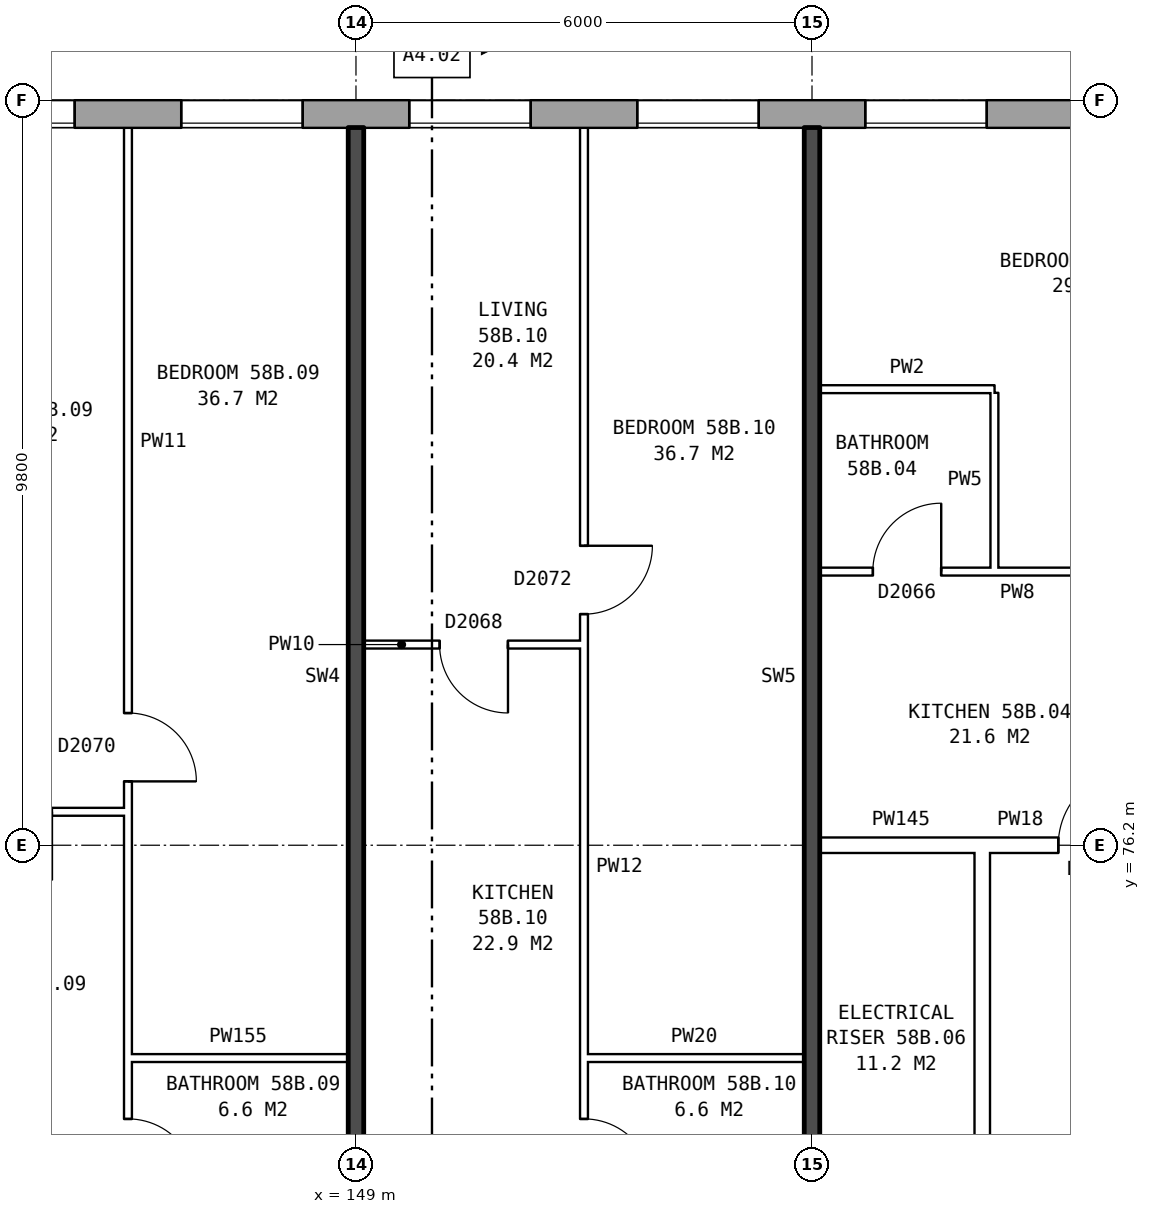
"""IFC4 building model, lengths in metres.
Left out: names, types, materials, properties, quantities, classifications, styles, units other than length and angle.
Written with IfcOpenShell. Run it as: python <this file> out.ifc"""

import sys

from ifc_helpers import new_model, si_unit, direction, frame, frame_2d, origin, place, context, subcontext, project, spatial, rectangle, extrude, element, fill, save


model = new_model("IFC4")
c1 = context("Model", 3, precision=1e-05, world=origin(), true_north=direction((0.0, 1.0)))
c2 = subcontext(c1, "Body", "Model", "MODEL_VIEW")
j1 = project(units=[si_unit("LENGTHUNIT", "METRE"), si_unit("PLANEANGLEUNIT", "RADIAN")], contexts=[c1])
p1 = place(None, origin())
s1 = spatial("IfcSite", under=j1, at=p1, CompositionType="ELEMENT")
p2 = place(p1, origin())
s2 = spatial("IfcBuilding", under=s1, at=p2, CompositionType="ELEMENT")
p3 = place(p2, frame((0.0, 0.0, 205.9)))
s3 = spatial("IfcBuildingStorey", under=s2, at=p3, CompositionType="ELEMENT", Elevation=205.9)
p4 = place(p3, frame((165.925, 85.82, 0.0), z_axis=(0.0, 0.0, 1.0), x_axis=(-1.0, 0.0, 0.0)))
e1 = element("IfcWall", 1, at=p4, inside=s3, PredefinedType="STANDARD", context=c2, shape_type="SweptSolid", body=[
    extrude(rectangle(XDim=33.875, YDim=0.36, at=frame_2d((16.938, 0.0))), origin(), (0.0, 0.0, 1.0), 2.85),
])
p5 = place(p4, frame((2.625, 0.0, 0.8)))
e2 = element("IfcOpeningElement", 2, at=p5, cuts=e1, PredefinedType="OPENING", context=c2, shape_type="SweptSolid", body=[
    extrude(rectangle(XDim=1.6, YDim=1.8, at=frame_2d((0.8, 0.9))), frame((0.0, 0.19, 0.0), z_axis=(0.0, -1.0, 0.0), x_axis=(1.0, 0.0, 0.0)), (0.0, 0.0, 1.0), 0.38),
])
p6 = place(p4, frame((5.625, 0.0, 0.8)))
e3 = element("IfcOpeningElement", 3, at=p6, cuts=e1, PredefinedType="OPENING", context=c2, shape_type="SweptSolid", body=[
    extrude(rectangle(XDim=1.6, YDim=1.8, at=frame_2d((0.8, 0.9))), frame((0.0, 0.19, 0.0), z_axis=(0.0, -1.0, 0.0), x_axis=(1.0, 0.0, 0.0)), (0.0, 0.0, 1.0), 0.38),
])
p7 = place(p4, frame((8.625, 0.0, 0.8)))
e4 = element("IfcOpeningElement", 4, at=p7, cuts=e1, PredefinedType="OPENING", context=c2, shape_type="SweptSolid", body=[
    extrude(rectangle(XDim=1.6, YDim=1.8, at=frame_2d((0.8, 0.9))), frame((0.0, 0.19, 0.0), z_axis=(0.0, -1.0, 0.0), x_axis=(1.0, 0.0, 0.0)), (0.0, 0.0, 1.0), 0.38),
])
p8 = place(p4, frame((11.625, 0.0, 0.8)))
e5 = element("IfcOpeningElement", 5, at=p8, cuts=e1, PredefinedType="OPENING", context=c2, shape_type="SweptSolid", body=[
    extrude(rectangle(XDim=1.6, YDim=1.8, at=frame_2d((0.8, 0.9))), frame((0.0, 0.19, 0.0), z_axis=(0.0, -1.0, 0.0), x_axis=(1.0, 0.0, 0.0)), (0.0, 0.0, 1.0), 0.38),
])
p9 = place(p4, frame((14.625, 0.0, 0.8)))
e6 = element("IfcOpeningElement", 6, at=p9, cuts=e1, PredefinedType="OPENING", context=c2, shape_type="SweptSolid", body=[
    extrude(rectangle(XDim=1.6, YDim=1.8, at=frame_2d((0.8, 0.9))), frame((0.0, 0.19, 0.0), z_axis=(0.0, -1.0, 0.0), x_axis=(1.0, 0.0, 0.0)), (0.0, 0.0, 1.0), 0.38),
])
p10 = place(p4, frame((17.625, 0.0, 0.8)))
e7 = element("IfcOpeningElement", 7, at=p10, cuts=e1, PredefinedType="OPENING", context=c2, shape_type="SweptSolid", body=[
    extrude(rectangle(XDim=1.6, YDim=1.8, at=frame_2d((0.8, 0.9))), frame((0.0, 0.19, 0.0), z_axis=(0.0, -1.0, 0.0), x_axis=(1.0, 0.0, 0.0)), (0.0, 0.0, 1.0), 0.38),
])
p11 = place(p4, frame((20.625, 0.0, 0.8)))
e8 = element("IfcOpeningElement", 8, at=p11, cuts=e1, PredefinedType="OPENING", context=c2, shape_type="SweptSolid", body=[
    extrude(rectangle(XDim=1.6, YDim=1.8, at=frame_2d((0.8, 0.9))), frame((0.0, 0.19, 0.0), z_axis=(0.0, -1.0, 0.0), x_axis=(1.0, 0.0, 0.0)), (0.0, 0.0, 1.0), 0.38),
])
p12 = place(p4, frame((23.625, 0.0, 0.8)))
e9 = element("IfcOpeningElement", 9, at=p12, cuts=e1, PredefinedType="OPENING", context=c2, shape_type="SweptSolid", body=[
    extrude(rectangle(XDim=1.6, YDim=1.8, at=frame_2d((0.8, 0.9))), frame((0.0, 0.19, 0.0), z_axis=(0.0, -1.0, 0.0), x_axis=(1.0, 0.0, 0.0)), (0.0, 0.0, 1.0), 0.38),
])
p13 = place(p4, frame((26.625, 0.0, 0.8)))
e10 = element("IfcOpeningElement", 10, at=p13, cuts=e1, PredefinedType="OPENING", context=c2, shape_type="SweptSolid", body=[
    extrude(rectangle(XDim=1.6, YDim=1.8, at=frame_2d((0.8, 0.9))), frame((0.0, 0.19, 0.0), z_axis=(0.0, -1.0, 0.0), x_axis=(1.0, 0.0, 0.0)), (0.0, 0.0, 1.0), 0.38),
])
p14 = place(p4, frame((29.125, 0.0, 0.8)))
e11 = element("IfcOpeningElement", 11, at=p14, cuts=e1, PredefinedType="OPENING", context=c2, shape_type="SweptSolid", body=[
    extrude(rectangle(XDim=1.4, YDim=1.8, at=frame_2d((0.7, 0.9))), frame((0.0, 0.19, 0.0), z_axis=(0.0, -1.0, 0.0), x_axis=(1.0, 0.0, 0.0)), (0.0, 0.0, 1.0), 0.38),
])
p15 = place(p4, frame((32.625, 0.0, 1.1)))
e12 = element("IfcOpeningElement", 12, at=p15, cuts=e1, PredefinedType="OPENING", context=c2, shape_type="SweptSolid", body=[
    extrude(rectangle(XDim=0.8, YDim=1.5, at=frame_2d((0.4, 0.75))), frame((0.0, 0.19, 0.0), z_axis=(0.0, -1.0, 0.0), x_axis=(1.0, 0.0, 0.0)), (0.0, 0.0, 1.0), 0.38),
])
p16 = place(p3, frame((157.24, 63.9, 0.0), z_axis=(0.0, 0.0, 1.0), x_axis=(0.0, 1.0, 0.0)))
e13 = element("IfcWall", 13, at=p16, inside=s3, PredefinedType="PARTITIONING", context=c2, shape_type="SweptSolid", body=[
    extrude(rectangle(XDim=12.2, YDim=0.2, at=frame_2d((6.1, 0.0))), origin(), (0.0, 0.0, 1.0), 2.85),
])
p17 = place(p16, frame((5.1, 0.0, 0.0)))
e14 = element("IfcOpeningElement", 14, at=p17, cuts=e13, PredefinedType="OPENING", context=c2, shape_type="SweptSolid", body=[
    extrude(rectangle(XDim=2.0, YDim=2.1, at=frame_2d((1.0, 1.05))), frame((0.0, 0.11, 0.0), z_axis=(0.0, -1.0, 0.0), x_axis=(1.0, 0.0, 0.0)), (0.0, 0.0, 1.0), 0.22),
])
for number, where, z_axis, x_axis in (
    (15, (146.0, 73.4, 0.0), (0.0, 0.0, 1.0), (1.0, 0.0, 0.0)),
    (16, (152.0, 73.4, 0.0), (0.0, 0.0, 1.0), (1.0, 0.0, 0.0)),
):
    element("IfcWall", number, at=place(p3, frame(where, z_axis=z_axis, x_axis=x_axis)), inside=s3, PredefinedType="PARTITIONING", context=c2, shape_type="SweptSolid", body=[
        extrude(rectangle(XDim=2.9, YDim=0.1, at=frame_2d((1.45, 0.0))), origin(), (0.0, 0.0, 1.0), 2.85),
    ])
p18 = place(p3, frame((155.1, 76.2, 0.0), z_axis=(0.0, 0.0, 1.0), x_axis=(1.0, 0.0, 0.0)))
e17 = element("IfcWall", 17, at=p18, inside=s3, PredefinedType="PARTITIONING", context=c2, shape_type="SweptSolid", body=[
    extrude(rectangle(XDim=2.14, YDim=0.2, at=frame_2d((1.07, 0.0))), origin(), (0.0, 0.0, 1.0), 2.85),
])
p19 = place(p3, frame((157.24, 76.2, 0.0), z_axis=(0.0, 0.0, 1.0), x_axis=(1.0, 0.0, 0.0)))
e18 = element("IfcWall", 18, at=p19, inside=s3, PredefinedType="PARTITIONING", context=c2, shape_type="SweptSolid", body=[
    extrude(rectangle(XDim=3.0, YDim=0.2, at=frame_2d((1.5, 0.0))), origin(), (0.0, 0.0, 1.0), 2.85),
])
p20 = place(p19, frame((1.0, 0.0, 0.0)))
e19 = element("IfcOpeningElement", 19, at=p20, cuts=e18, PredefinedType="OPENING", context=c2, shape_type="SweptSolid", body=[
    extrude(rectangle(XDim=1.0, YDim=2.1, at=frame_2d((0.5, 1.05))), frame((0.0, 0.11, 0.0), z_axis=(0.0, -1.0, 0.0), x_axis=(1.0, 0.0, 0.0)), (0.0, 0.0, 1.0), 0.22),
])
p21 = place(p3, frame((143.1, 76.64, 0.0), z_axis=(0.0, 0.0, 1.0), x_axis=(1.0, 0.0, 0.0)))
e20 = element("IfcWall", 20, at=p21, inside=s3, PredefinedType="PARTITIONING", context=c2, shape_type="SweptSolid", body=[
    extrude(rectangle(XDim=2.9, YDim=0.1, at=frame_2d((1.45, 0.0))), origin(), (0.0, 0.0, 1.0), 2.85),
])
p22 = place(p21, frame((1.0, 0.0, 0.0)))
e21 = element("IfcOpeningElement", 21, at=p22, cuts=e20, PredefinedType="OPENING", context=c2, shape_type="SweptSolid", body=[
    extrude(rectangle(XDim=0.9, YDim=2.1, at=frame_2d((0.45, 1.05))), frame((0.0, 0.06, 0.0), z_axis=(0.0, -1.0, 0.0), x_axis=(1.0, 0.0, 0.0)), (0.0, 0.0, 1.0), 0.12),
])
p23 = place(p3, frame((149.1, 78.84, 0.0), z_axis=(0.0, 0.0, 1.0), x_axis=(1.0, 0.0, 0.0)))
e22 = element("IfcWall", 22, at=p23, inside=s3, PredefinedType="PARTITIONING", context=c2, shape_type="SweptSolid", body=[
    extrude(rectangle(XDim=2.9, YDim=0.1, at=frame_2d((1.45, 0.0))), origin(), (0.0, 0.0, 1.0), 2.85),
])
p24 = place(p23, frame((1.0, 0.0, 0.0)))
e23 = element("IfcOpeningElement", 23, at=p24, cuts=e22, PredefinedType="OPENING", context=c2, shape_type="SweptSolid", body=[
    extrude(rectangle(XDim=0.9, YDim=2.1, at=frame_2d((0.45, 1.05))), frame((0.0, 0.06, 0.0), z_axis=(0.0, -1.0, 0.0), x_axis=(1.0, 0.0, 0.0)), (0.0, 0.0, 1.0), 0.12),
])
p25 = place(p3, frame((155.1, 79.8, 0.0), z_axis=(0.0, 0.0, 1.0), x_axis=(1.0, 0.0, 0.0)))
e24 = element("IfcWall", 24, at=p25, inside=s3, PredefinedType="PARTITIONING", context=c2, shape_type="SweptSolid", body=[
    extrude(rectangle(XDim=5.8, YDim=0.1, at=frame_2d((2.9, 0.0))), origin(), (0.0, 0.0, 1.0), 2.85),
])
p26 = place(p25, frame((3.6, 0.0, 0.0)))
e25 = element("IfcOpeningElement", 25, at=p26, cuts=e24, PredefinedType="OPENING", context=c2, shape_type="SweptSolid", body=[
    extrude(rectangle(XDim=0.9, YDim=2.1, at=frame_2d((0.45, 1.05))), frame((0.0, 0.06, 0.0), z_axis=(0.0, -1.0, 0.0), x_axis=(1.0, 0.0, 0.0)), (0.0, 0.0, 1.0), 0.12),
])
p27 = place(p25, frame((0.7, 0.0, 0.0)))
e26 = element("IfcOpeningElement", 26, at=p27, cuts=e24, PredefinedType="OPENING", context=c2, shape_type="SweptSolid", body=[
    extrude(rectangle(XDim=0.9, YDim=2.1, at=frame_2d((0.45, 1.05))), frame((0.0, 0.06, 0.0), z_axis=(0.0, -1.0, 0.0), x_axis=(1.0, 0.0, 0.0)), (0.0, 0.0, 1.0), 0.12),
])
p28 = place(p3, frame((155.1, 82.2, 0.0), z_axis=(0.0, 0.0, 1.0), x_axis=(1.0, 0.0, 0.0)))
e27 = element("IfcWall", 27, at=p28, inside=s3, PredefinedType="PARTITIONING", context=c2, shape_type="SweptSolid", body=[
    extrude(rectangle(XDim=2.3, YDim=0.1, at=frame_2d((1.15, 0.0))), origin(), (0.0, 0.0, 1.0), 2.85),
])
p29 = place(p3, frame((146.0, 71.3, 0.0), z_axis=(0.0, 0.0, 1.0), x_axis=(0.0, 1.0, 0.0)))
e28 = element("IfcWall", 28, at=p29, inside=s3, PredefinedType="PARTITIONING", context=c2, shape_type="SweptSolid", body=[
    extrude(rectangle(XDim=14.34, YDim=0.1, at=frame_2d((7.17, 0.0))), origin(), (0.0, 0.0, 1.0), 2.85),
])
p30 = place(p29, frame((5.74, 0.0, 0.0)))
e29 = element("IfcOpeningElement", 29, at=p30, cuts=e28, PredefinedType="OPENING", context=c2, shape_type="SweptSolid", body=[
    extrude(rectangle(XDim=0.9, YDim=2.1, at=frame_2d((0.45, 1.05))), frame((0.0, 0.06, 0.0), z_axis=(0.0, -1.0, 0.0), x_axis=(1.0, 0.0, 0.0)), (0.0, 0.0, 1.0), 0.12),
])
p31 = place(p29, frame((0.4, 0.0, 0.0)))
e30 = element("IfcOpeningElement", 30, at=p31, cuts=e28, PredefinedType="OPENING", context=c2, shape_type="SweptSolid", body=[
    extrude(rectangle(XDim=0.9, YDim=2.1, at=frame_2d((0.45, 1.05))), frame((0.0, 0.06, 0.0), z_axis=(0.0, -1.0, 0.0), x_axis=(1.0, 0.0, 0.0)), (0.0, 0.0, 1.0), 0.12),
])
p32 = place(p3, frame((149.0, 71.2, 0.0), z_axis=(0.0, 0.0, 1.0), x_axis=(0.0, 1.0, 0.0)))
e31 = element("IfcWall", 31, at=p32, inside=s3, PredefinedType="SOLIDWALL", context=c2, shape_type="SweptSolid", body=[
    extrude(rectangle(XDim=14.44, YDim=0.2, at=frame_2d((7.22, 0.0))), origin(), (0.0, 0.0, 1.0), 2.85),
])
p33 = place(p3, frame((152.0, 71.3, 0.0), z_axis=(0.0, 0.0, 1.0), x_axis=(0.0, 1.0, 0.0)))
e32 = element("IfcWall", 32, at=p33, inside=s3, PredefinedType="PARTITIONING", context=c2, shape_type="SweptSolid", body=[
    extrude(rectangle(XDim=14.34, YDim=0.1, at=frame_2d((7.17, 0.0))), origin(), (0.0, 0.0, 1.0), 2.85),
])
p34 = place(p33, frame((7.94, 0.0, 0.0)))
e33 = element("IfcOpeningElement", 33, at=p34, cuts=e32, PredefinedType="OPENING", context=c2, shape_type="SweptSolid", body=[
    extrude(rectangle(XDim=0.9, YDim=2.1, at=frame_2d((0.45, 1.05))), frame((0.0, 0.06, 0.0), z_axis=(0.0, -1.0, 0.0), x_axis=(1.0, 0.0, 0.0)), (0.0, 0.0, 1.0), 0.12),
])
p35 = place(p33, frame((0.4, 0.0, 0.0)))
e34 = element("IfcOpeningElement", 34, at=p35, cuts=e32, PredefinedType="OPENING", context=c2, shape_type="SweptSolid", body=[
    extrude(rectangle(XDim=0.9, YDim=2.1, at=frame_2d((0.45, 1.05))), frame((0.0, 0.06, 0.0), z_axis=(0.0, -1.0, 0.0), x_axis=(1.0, 0.0, 0.0)), (0.0, 0.0, 1.0), 0.12),
])
p36 = place(p3, frame((155.0, 71.2, 0.0), z_axis=(0.0, 0.0, 1.0), x_axis=(0.0, 1.0, 0.0)))
e35 = element("IfcWall", 35, at=p36, inside=s3, PredefinedType="SOLIDWALL", context=c2, shape_type="SweptSolid", body=[
    extrude(rectangle(XDim=14.44, YDim=0.2, at=frame_2d((7.22, 0.0))), origin(), (0.0, 0.0, 1.0), 2.85),
])
p37 = place(p3, frame((157.4, 79.85, 0.0), z_axis=(0.0, 0.0, 1.0), x_axis=(0.0, 1.0, 0.0)))
e36 = element("IfcWall", 36, at=p37, inside=s3, PredefinedType="PARTITIONING", context=c2, shape_type="SweptSolid", body=[
    extrude(rectangle(XDim=2.3, YDim=0.1, at=frame_2d((1.15, 0.0))), origin(), (0.0, 0.0, 1.0), 2.85),
])
p38 = place(p7, origin())
e37 = element("IfcWindow", 37, at=p38, inside=s3, PartitioningType="SINGLE_PANEL", PredefinedType="WINDOW", context=c2, shape_type="SweptSolid", body=[
    extrude(rectangle(XDim=1.6, YDim=1.8, at=frame_2d((0.8, 0.9))), frame((0.0, 0.15, 0.0), z_axis=(0.0, -1.0, 0.0), x_axis=(1.0, 0.0, 0.0)), (0.0, 0.0, 1.0), 0.06),
])
fill(e4, e37)
p39 = place(p8, origin())
e38 = element("IfcWindow", 38, at=p39, inside=s3, PartitioningType="SINGLE_PANEL", PredefinedType="WINDOW", context=c2, shape_type="SweptSolid", body=[
    extrude(rectangle(XDim=1.6, YDim=1.8, at=frame_2d((0.8, 0.9))), frame((0.0, 0.15, 0.0), z_axis=(0.0, -1.0, 0.0), x_axis=(1.0, 0.0, 0.0)), (0.0, 0.0, 1.0), 0.06),
])
fill(e5, e38)
p40 = place(p9, origin())
e39 = element("IfcWindow", 39, at=p40, inside=s3, PartitioningType="SINGLE_PANEL", PredefinedType="WINDOW", context=c2, shape_type="SweptSolid", body=[
    extrude(rectangle(XDim=1.6, YDim=1.8, at=frame_2d((0.8, 0.9))), frame((0.0, 0.15, 0.0), z_axis=(0.0, -1.0, 0.0), x_axis=(1.0, 0.0, 0.0)), (0.0, 0.0, 1.0), 0.06),
])
fill(e6, e39)
p41 = place(p10, origin())
e40 = element("IfcWindow", 40, at=p41, inside=s3, PartitioningType="SINGLE_PANEL", PredefinedType="WINDOW", context=c2, shape_type="SweptSolid", body=[
    extrude(rectangle(XDim=1.6, YDim=1.8, at=frame_2d((0.8, 0.9))), frame((0.0, 0.15, 0.0), z_axis=(0.0, -1.0, 0.0), x_axis=(1.0, 0.0, 0.0)), (0.0, 0.0, 1.0), 0.06),
])
fill(e7, e40)
p42 = place(p11, origin())
e41 = element("IfcWindow", 41, at=p42, inside=s3, PartitioningType="SINGLE_PANEL", PredefinedType="WINDOW", context=c2, shape_type="SweptSolid", body=[
    extrude(rectangle(XDim=1.6, YDim=1.8, at=frame_2d((0.8, 0.9))), frame((0.0, 0.15, 0.0), z_axis=(0.0, -1.0, 0.0), x_axis=(1.0, 0.0, 0.0)), (0.0, 0.0, 1.0), 0.06),
])
fill(e8, e41)
p43 = place(p20, origin())
e42 = element("IfcDoor", 42, at=p43, inside=s3, OperationType="SINGLE_SWING_RIGHT", PredefinedType="DOOR", context=c2, shape_type="SweptSolid", body=[
    extrude(rectangle(XDim=1.0, YDim=2.1, at=frame_2d((0.5, 1.05))), frame((0.0, 0.025, 0.0), z_axis=(0.0, -1.0, 0.0), x_axis=(1.0, 0.0, 0.0)), (0.0, 0.0, 1.0), 0.05),
])
fill(e19, e42)
p44 = place(p27, origin())
e43 = element("IfcDoor", 43, at=p44, inside=s3, OperationType="SINGLE_SWING_RIGHT", PredefinedType="DOOR", context=c2, shape_type="SweptSolid", body=[
    extrude(rectangle(XDim=0.9, YDim=2.1, at=frame_2d((0.45, 1.05))), frame((0.0, 0.025, 0.0), z_axis=(0.0, -1.0, 0.0), x_axis=(1.0, 0.0, 0.0)), (0.0, 0.0, 1.0), 0.05),
])
fill(e26, e43)
p45 = place(p30, frame((0.9, 0.0, 0.0), z_axis=(0.0, 0.0, 1.0), x_axis=(-1.0, 0.0, 0.0)))
e44 = element("IfcDoor", 44, at=p45, inside=s3, OperationType="SINGLE_SWING_RIGHT", PredefinedType="DOOR", context=c2, shape_type="SweptSolid", body=[
    extrude(rectangle(XDim=0.9, YDim=2.1, at=frame_2d((0.45, 1.05))), frame((0.0, 0.025, 0.0), z_axis=(0.0, -1.0, 0.0), x_axis=(1.0, 0.0, 0.0)), (0.0, 0.0, 1.0), 0.05),
])
fill(e29, e44)
p46 = place(p31, frame((0.9, 0.0, 0.0), z_axis=(0.0, 0.0, 1.0), x_axis=(-1.0, 0.0, 0.0)))
e45 = element("IfcDoor", 45, at=p46, inside=s3, OperationType="SINGLE_SWING_RIGHT", PredefinedType="DOOR", context=c2, shape_type="SweptSolid", body=[
    extrude(rectangle(XDim=0.9, YDim=2.1, at=frame_2d((0.45, 1.05))), frame((0.0, 0.025, 0.0), z_axis=(0.0, -1.0, 0.0), x_axis=(1.0, 0.0, 0.0)), (0.0, 0.0, 1.0), 0.05),
])
fill(e30, e45)
p47 = place(p34, frame((0.9, 0.0, 0.0), z_axis=(0.0, 0.0, 1.0), x_axis=(-1.0, 0.0, 0.0)))
e46 = element("IfcDoor", 46, at=p47, inside=s3, OperationType="SINGLE_SWING_LEFT", PredefinedType="DOOR", context=c2, shape_type="SweptSolid", body=[
    extrude(rectangle(XDim=0.9, YDim=2.1, at=frame_2d((0.45, 1.05))), frame((0.0, 0.025, 0.0), z_axis=(0.0, -1.0, 0.0), x_axis=(1.0, 0.0, 0.0)), (0.0, 0.0, 1.0), 0.05),
])
fill(e33, e46)
p48 = place(p24, frame((0.9, 0.0, 0.0), z_axis=(0.0, 0.0, 1.0), x_axis=(-1.0, 0.0, 0.0)))
e47 = element("IfcDoor", 47, at=p48, inside=s3, OperationType="SINGLE_SWING_LEFT", PredefinedType="DOOR", context=c2, shape_type="SweptSolid", body=[
    extrude(rectangle(XDim=0.9, YDim=2.1, at=frame_2d((0.45, 1.05))), frame((0.0, 0.025, 0.0), z_axis=(0.0, -1.0, 0.0), x_axis=(1.0, 0.0, 0.0)), (0.0, 0.0, 1.0), 0.05),
])
fill(e23, e47)
p49 = place(p35, frame((0.9, 0.0, 0.0), z_axis=(0.0, 0.0, 1.0), x_axis=(-1.0, 0.0, 0.0)))
e48 = element("IfcDoor", 48, at=p49, inside=s3, OperationType="SINGLE_SWING_RIGHT", PredefinedType="DOOR", context=c2, shape_type="SweptSolid", body=[
    extrude(rectangle(XDim=0.9, YDim=2.1, at=frame_2d((0.45, 1.05))), frame((0.0, 0.025, 0.0), z_axis=(0.0, -1.0, 0.0), x_axis=(1.0, 0.0, 0.0)), (0.0, 0.0, 1.0), 0.05),
])
fill(e34, e48)
save(model, sys.argv[1])
